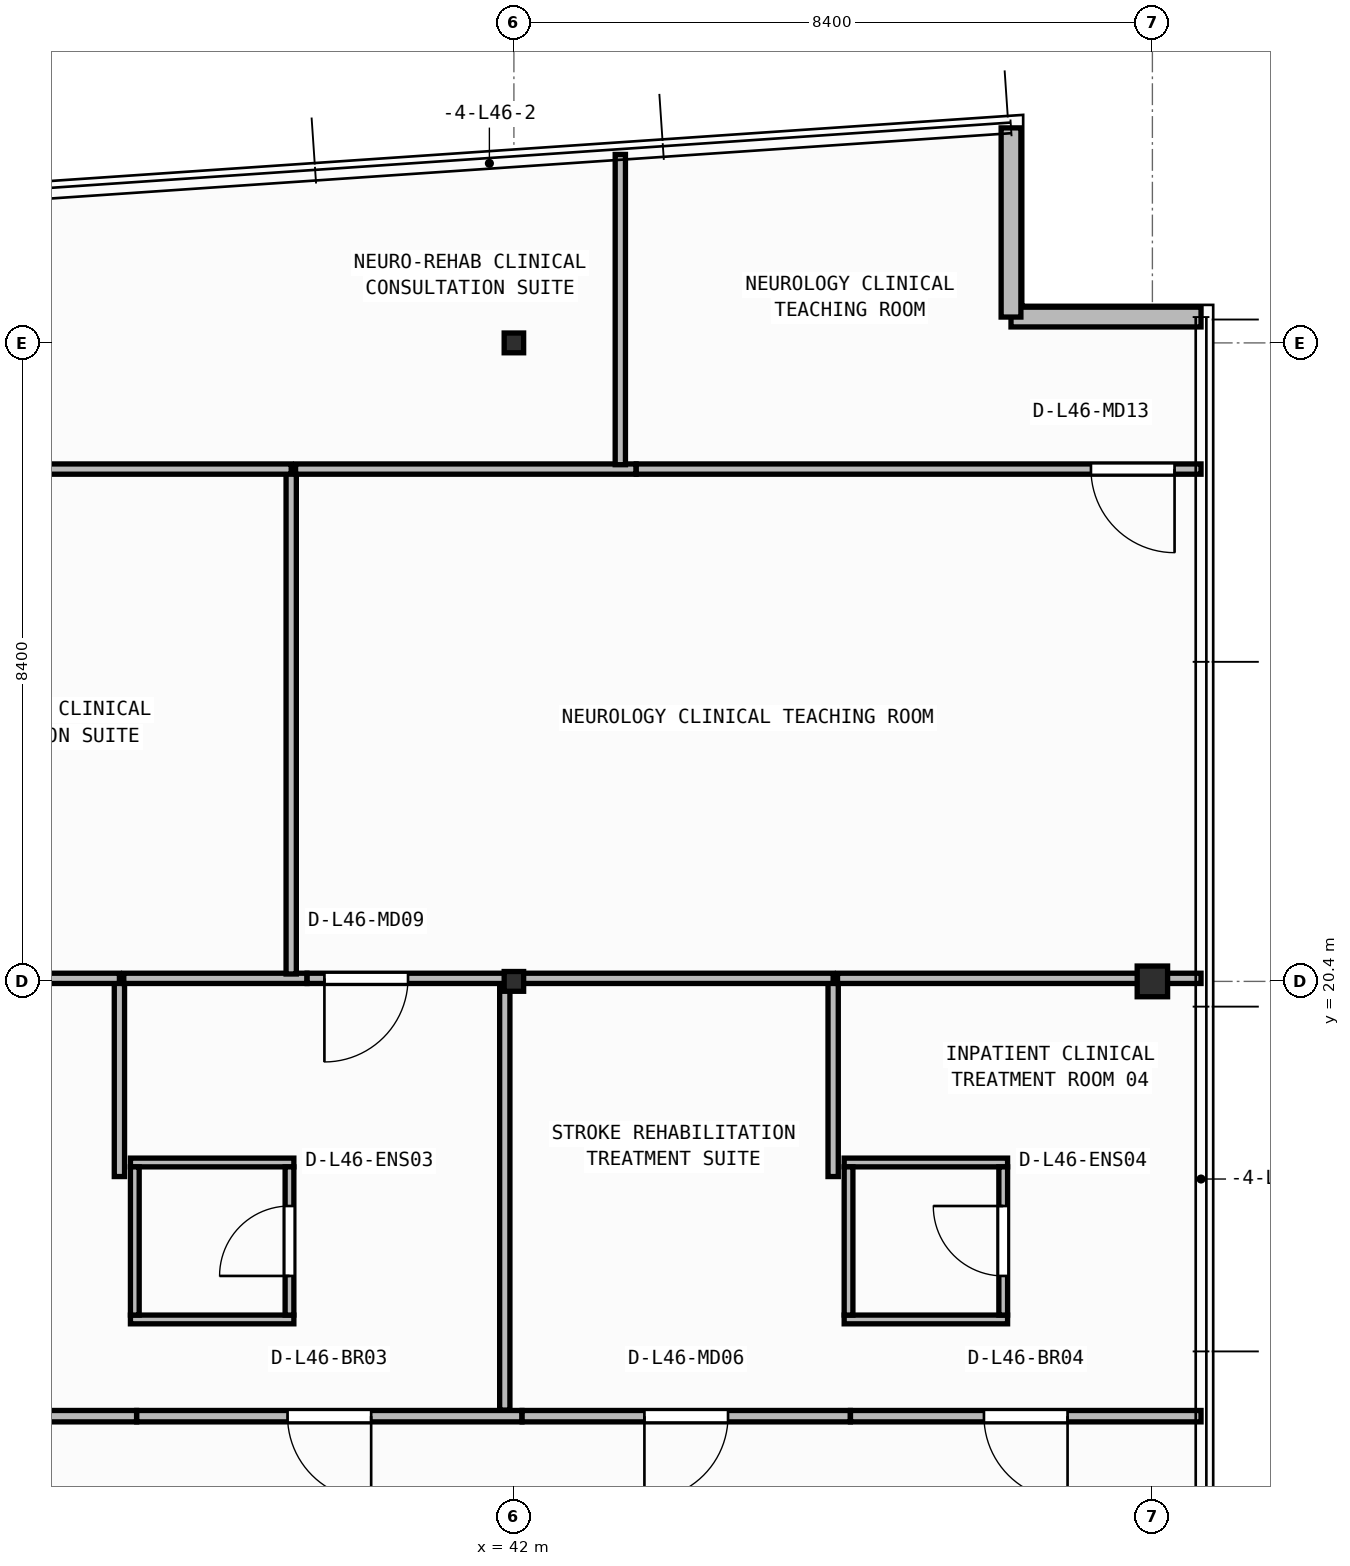
"""IFC4 building model, lengths in metres.
Left out: names, types, materials, properties, quantities, classifications, styles, units other than length and angle.
Written with IfcOpenShell. Run it as: python <this file> out.ifc"""

import sys

from ifc_helpers import new_model, si_unit, direction, frame, frame_2d, origin, origin_2d, place, context, subcontext, project, spatial, rectangle, i_section, extrude, element, fill, save


model = new_model("IFC4")
c1 = context("Model", 3, precision=1e-05, world=origin(), true_north=direction((0.0, 1.0)))
c2 = subcontext(c1, "Body", "Model", "MODEL_VIEW")
j1 = project(units=[si_unit("LENGTHUNIT", "METRE"), si_unit("PLANEANGLEUNIT", "RADIAN")], contexts=[c1])
p1 = place(None, origin())
s1 = spatial("IfcSite", under=j1, at=p1, CompositionType="ELEMENT")
p2 = place(p1, origin())
s2 = spatial("IfcBuilding", under=s1, at=p2, CompositionType="ELEMENT")
p3 = place(p2, frame((0.0, 0.0, 188.15)))
s3 = spatial("IfcBuildingStorey", under=s2, at=p3, CompositionType="ELEMENT", Elevation=188.15)
p4 = place(p3, frame((42.0, 20.4, 0.0), z_axis=(0.0, 0.0, 1.0), x_axis=(1.0, 0.0, 0.0)))
e1 = element("IfcColumn", 1, at=p4, inside=s3, PredefinedType="COLUMN", context=c2, shape_type="SweptSolid", body=[
    extrude(i_section(OverallWidth=0.256, OverallDepth=0.26, WebThickness=0.01, FlangeThickness=0.017, FilletRadius=0.013, at=origin_2d()), origin(), (0.0, 0.0, 1.0), 3.95),
])
p5 = place(p3, frame((50.4, 20.4, 0.0), z_axis=(0.0, 0.0, 1.0), x_axis=(1.0, 0.0, 0.0)))
e2 = element("IfcColumn", 2, at=p5, inside=s3, PredefinedType="COLUMN", context=c2, shape_type="SweptSolid", body=[
    extrude(i_section(OverallWidth=0.4, OverallDepth=0.404, WebThickness=0.02, FlangeThickness=0.032, at=origin_2d()), origin(), (0.0, 0.0, 1.0), 3.95),
])
p6 = place(p3, frame((42.0, 28.8, 0.0), z_axis=(0.0, 0.0, 1.0), x_axis=(1.0, 0.0, 0.0)))
e3 = element("IfcColumn", 3, at=p6, inside=s3, PredefinedType="COLUMN", context=c2, shape_type="SweptSolid", body=[
    extrude(i_section(OverallWidth=0.256, OverallDepth=0.26, WebThickness=0.01, FlangeThickness=0.017, FilletRadius=0.013, at=origin_2d()), origin(), (0.0, 0.0, 1.0), 3.95),
])
p7 = place(p3, frame((51.04, 29.14, 0.0), z_axis=(0.0, 0.0, 1.0), x_axis=(-1.0, 0.0, 0.0)))
e4 = element("IfcWall", 4, at=p7, inside=s3, PredefinedType="STANDARD", context=c2, shape_type="SweptSolid", body=[
    extrude(rectangle(XDim=2.5, YDim=0.26, at=frame_2d((1.25, 0.0))), origin(), (0.0, 0.0, 1.0), 3.71),
])
p8 = place(p3, frame((48.54, 29.14, 0.0), z_axis=(0.0, 0.0, 1.0), x_axis=(0.0, 1.0, 0.0)))
e5 = element("IfcWall", 5, at=p8, inside=s3, PredefinedType="STANDARD", context=c2, shape_type="SweptSolid", body=[
    extrude(rectangle(XDim=2.489, YDim=0.26, at=frame_2d((1.245, 0.0))), origin(), (0.0, 0.0, 1.0), 3.71),
])
p9 = place(p3, frame((36.955, 15.952, 0.0), z_axis=(0.0, 0.0, 1.0), x_axis=(1.0, 0.0, 0.0)))
e6 = element("IfcWall", 6, at=p9, inside=s3, PredefinedType="PARTITIONING", context=c2, shape_type="SweptSolid", body=[
    extrude(rectangle(XDim=2.15, YDim=0.115, at=frame_2d((1.075, 0.0))), origin(), (0.0, 0.0, 1.0), 3.378),
])
p10 = place(p3, frame((36.955, 18.018, 0.0), z_axis=(0.0, 0.0, 1.0), x_axis=(1.0, 0.0, 0.0)))
e7 = element("IfcWall", 7, at=p10, inside=s3, PredefinedType="PARTITIONING", context=c2, shape_type="SweptSolid", body=[
    extrude(rectangle(XDim=2.15, YDim=0.115, at=frame_2d((1.075, 0.0))), origin(), (0.0, 0.0, 1.0), 3.71),
])
p11 = place(p3, frame((37.012, 16.01, 0.0), z_axis=(0.0, 0.0, 1.0), x_axis=(0.0, 1.0, 0.0)))
e8 = element("IfcWall", 8, at=p11, inside=s3, PredefinedType="PARTITIONING", context=c2, shape_type="SweptSolid", body=[
    extrude(rectangle(XDim=1.95, YDim=0.115, at=frame_2d((0.975, 0.0))), origin(), (0.0, 0.0, 1.0), 3.71),
])
p12 = place(p3, frame((39.048, 16.01, 0.0), z_axis=(0.0, 0.0, 1.0), x_axis=(0.0, 1.0, 0.0)))
e9 = element("IfcWall", 9, at=p12, inside=s3, PredefinedType="PARTITIONING", context=c2, shape_type="SweptSolid", body=[
    extrude(rectangle(XDim=1.95, YDim=0.115, at=frame_2d((0.975, 0.0))), origin(), (0.0, 0.0, 1.0), 3.71),
])
p13 = place(p12, frame((0.515, 0.0, 0.0)))
e10 = element("IfcOpeningElement", 10, at=p13, cuts=e9, PredefinedType="OPENING", context=c2, shape_type="SweptSolid", body=[
    extrude(rectangle(XDim=0.92, YDim=2.1, at=frame_2d((0.46, 1.05))), frame((0.0, 0.067, 0.0), z_axis=(0.0, -1.0, 0.0), x_axis=(1.0, 0.0, 0.0)), (0.0, 0.0, 1.0), 0.135),
])
p14 = place(p3, frame((46.345, 15.952, 0.0), z_axis=(0.0, 0.0, 1.0), x_axis=(1.0, 0.0, 0.0)))
e11 = element("IfcWall", 11, at=p14, inside=s3, PredefinedType="PARTITIONING", context=c2, shape_type="SweptSolid", body=[
    extrude(rectangle(XDim=2.15, YDim=0.115, at=frame_2d((1.075, 0.0))), origin(), (0.0, 0.0, 1.0), 3.378),
])
p15 = place(p3, frame((46.345, 18.018, 0.0), z_axis=(0.0, 0.0, 1.0), x_axis=(1.0, 0.0, 0.0)))
e12 = element("IfcWall", 12, at=p15, inside=s3, PredefinedType="PARTITIONING", context=c2, shape_type="SweptSolid", body=[
    extrude(rectangle(XDim=2.15, YDim=0.115, at=frame_2d((1.075, 0.0))), origin(), (0.0, 0.0, 1.0), 3.71),
])
p16 = place(p3, frame((46.403, 16.01, 0.0), z_axis=(0.0, 0.0, 1.0), x_axis=(0.0, 1.0, 0.0)))
e13 = element("IfcWall", 13, at=p16, inside=s3, PredefinedType="PARTITIONING", context=c2, shape_type="SweptSolid", body=[
    extrude(rectangle(XDim=1.95, YDim=0.115, at=frame_2d((0.975, 0.0))), origin(), (0.0, 0.0, 1.0), 3.71),
])
p17 = place(p3, frame((48.438, 16.01, 0.0), z_axis=(0.0, 0.0, 1.0), x_axis=(0.0, 1.0, 0.0)))
e14 = element("IfcWall", 14, at=p17, inside=s3, PredefinedType="PARTITIONING", context=c2, shape_type="SweptSolid", body=[
    extrude(rectangle(XDim=1.95, YDim=0.115, at=frame_2d((0.975, 0.0))), origin(), (0.0, 0.0, 1.0), 3.71),
])
p18 = place(p17, frame((0.515, 0.0, 0.0)))
e15 = element("IfcOpeningElement", 15, at=p18, cuts=e14, PredefinedType="OPENING", context=c2, shape_type="SweptSolid", body=[
    extrude(rectangle(XDim=0.92, YDim=2.1, at=frame_2d((0.46, 1.05))), frame((0.0, 0.067, 0.0), z_axis=(0.0, -1.0, 0.0), x_axis=(1.0, 0.0, 0.0)), (0.0, 0.0, 1.0), 0.135),
])
p19 = place(p3, frame((37.036, 14.68, 0.0), z_axis=(0.0, 0.0, 1.0), x_axis=(-1.0, 0.0, 0.0)))
e16 = element("IfcWall", 16, at=p19, inside=s3, PredefinedType="PARTITIONING", context=c2, shape_type="SweptSolid", body=[
    extrude(rectangle(XDim=4.688, YDim=0.15, at=frame_2d((2.344, 0.0))), origin(), (0.0, 0.0, 1.0), 3.71),
])
p20 = place(p19, frame((1.794, 0.0, 0.0)))
e17 = element("IfcOpeningElement", 17, at=p20, cuts=e16, PredefinedType="OPENING", context=c2, shape_type="SweptSolid", body=[
    extrude(rectangle(XDim=1.1, YDim=2.1, at=frame_2d((0.55, 1.05))), frame((0.0, 0.085, 0.0), z_axis=(0.0, -1.0, 0.0), x_axis=(1.0, 0.0, 0.0)), (0.0, 0.0, 1.0), 0.17),
])
p21 = place(p3, frame((42.106, 14.68, 0.0), z_axis=(0.0, 0.0, 1.0), x_axis=(-1.0, 0.0, 0.0)))
e18 = element("IfcWall", 18, at=p21, inside=s3, PredefinedType="PARTITIONING", context=c2, shape_type="SweptSolid", body=[
    extrude(rectangle(XDim=5.068, YDim=0.15, at=frame_2d((2.534, 0.0))), origin(), (0.0, 0.0, 1.0), 3.71),
])
p22 = place(p21, frame((1.984, 0.0, 0.0)))
e19 = element("IfcOpeningElement", 19, at=p22, cuts=e18, PredefinedType="OPENING", context=c2, shape_type="SweptSolid", body=[
    extrude(rectangle(XDim=1.1, YDim=2.1, at=frame_2d((0.55, 1.05))), frame((0.0, 0.085, 0.0), z_axis=(0.0, -1.0, 0.0), x_axis=(1.0, 0.0, 0.0)), (0.0, 0.0, 1.0), 0.17),
])
p23 = place(p3, frame((46.426, 14.68, 0.0), z_axis=(0.0, 0.0, 1.0), x_axis=(-1.0, 0.0, 0.0)))
e20 = element("IfcWall", 20, at=p23, inside=s3, PredefinedType="PARTITIONING", context=c2, shape_type="SweptSolid", body=[
    extrude(rectangle(XDim=4.318, YDim=0.15, at=frame_2d((2.159, 0.0))), origin(), (0.0, 0.0, 1.0), 3.71),
])
p24 = place(p23, frame((1.609, 0.0, 0.0)))
e21 = element("IfcOpeningElement", 21, at=p24, cuts=e20, PredefinedType="OPENING", context=c2, shape_type="SweptSolid", body=[
    extrude(rectangle(XDim=1.1, YDim=2.1, at=frame_2d((0.55, 1.05))), frame((0.0, 0.085, 0.0), z_axis=(0.0, -1.0, 0.0), x_axis=(1.0, 0.0, 0.0)), (0.0, 0.0, 1.0), 0.17),
])
p25 = place(p3, frame((51.04, 14.68, 0.0), z_axis=(0.0, 0.0, 1.0), x_axis=(-1.0, 0.0, 0.0)))
e22 = element("IfcWall", 22, at=p25, inside=s3, PredefinedType="PARTITIONING", context=c2, shape_type="SweptSolid", body=[
    extrude(rectangle(XDim=4.612, YDim=0.15, at=frame_2d((2.306, 0.0))), origin(), (0.0, 0.0, 1.0), 3.71),
])
p26 = place(p25, frame((1.756, 0.0, 0.0)))
e23 = element("IfcOpeningElement", 23, at=p26, cuts=e22, PredefinedType="OPENING", context=c2, shape_type="SweptSolid", body=[
    extrude(rectangle(XDim=1.1, YDim=2.1, at=frame_2d((0.55, 1.05))), frame((0.0, 0.085, 0.0), z_axis=(0.0, -1.0, 0.0), x_axis=(1.0, 0.0, 0.0)), (0.0, 0.0, 1.0), 0.17),
])
p27 = place(p3, frame((36.81, 17.833, 0.0), z_axis=(0.0, 0.0, 1.0), x_axis=(0.0, 1.0, 0.0)))
e24 = element("IfcWall", 24, at=p27, inside=s3, PredefinedType="PARTITIONING", context=c2, shape_type="SweptSolid", body=[
    extrude(rectangle(XDim=2.607, YDim=0.135, at=frame_2d((1.304, 0.0))), origin(), (0.0, 0.0, 1.0), 3.71),
])
p28 = place(p3, frame((36.81, 20.44, 0.0), z_axis=(0.0, 0.0, 1.0), x_axis=(-1.0, 0.0, 0.0)))
e25 = element("IfcWall", 25, at=p28, inside=s3, PredefinedType="PARTITIONING", context=c2, shape_type="SweptSolid", body=[
    extrude(rectangle(XDim=4.633, YDim=0.135, at=frame_2d((2.316, 0.0))), origin(), (0.0, 0.0, 1.0), 3.152),
])
p29 = place(p3, frame((41.88, 14.76, 0.0), z_axis=(0.0, 0.0, 1.0), x_axis=(0.0, 1.0, 0.0)))
e26 = element("IfcWall", 26, at=p29, inside=s3, PredefinedType="PARTITIONING", context=c2, shape_type="SweptSolid", body=[
    extrude(rectangle(XDim=5.68, YDim=0.135, at=frame_2d((2.84, 0.0))), origin(), (0.0, 0.0, 1.0), 3.152),
])
p30 = place(p3, frame((39.278, 20.44, 0.0), z_axis=(0.0, 0.0, 1.0), x_axis=(-1.0, 0.0, 0.0)))
e27 = element("IfcWall", 27, at=p30, inside=s3, PredefinedType="PARTITIONING", context=c2, shape_type="SweptSolid", body=[
    extrude(rectangle(XDim=2.41, YDim=0.135, at=frame_2d((1.205, 0.0))), origin(), (0.0, 0.0, 1.0), 3.152),
])
p31 = place(p3, frame((41.88, 20.44, 0.0), z_axis=(0.0, 0.0, 1.0), x_axis=(-1.0, 0.0, 0.0)))
e28 = element("IfcWall", 28, at=p31, inside=s3, PredefinedType="PARTITIONING", context=c2, shape_type="SweptSolid", body=[
    extrude(rectangle(XDim=2.6, YDim=0.135, at=frame_2d((1.3, 0.0))), origin(), (0.0, 0.0, 1.0), 3.152),
])
p32 = place(p31, frame((1.273, 0.0, 0.0)))
e29 = element("IfcOpeningElement", 29, at=p32, cuts=e28, PredefinedType="OPENING", context=c2, shape_type="SweptSolid", body=[
    extrude(rectangle(XDim=1.1, YDim=2.1, at=frame_2d((0.55, 1.05))), frame((0.0, 0.077, 0.0), z_axis=(0.0, -1.0, 0.0), x_axis=(1.0, 0.0, 0.0)), (0.0, 0.0, 1.0), 0.155),
])
p33 = place(p3, frame((46.2, 17.833, 0.0), z_axis=(0.0, 0.0, 1.0), x_axis=(0.0, 1.0, 0.0)))
e30 = element("IfcWall", 30, at=p33, inside=s3, PredefinedType="PARTITIONING", context=c2, shape_type="SweptSolid", body=[
    extrude(rectangle(XDim=2.607, YDim=0.135, at=frame_2d((1.304, 0.0))), origin(), (0.0, 0.0, 1.0), 3.71),
])
p34 = place(p3, frame((46.2, 20.44, 0.0), z_axis=(0.0, 0.0, 1.0), x_axis=(-1.0, 0.0, 0.0)))
e31 = element("IfcWall", 31, at=p34, inside=s3, PredefinedType="PARTITIONING", context=c2, shape_type="SweptSolid", body=[
    extrude(rectangle(XDim=4.262, YDim=0.135, at=frame_2d((2.131, 0.0))), origin(), (0.0, 0.0, 1.0), 3.152),
])
p35 = place(p3, frame((51.04, 20.44, 0.0), z_axis=(0.0, 0.0, 1.0), x_axis=(-1.0, 0.0, 0.0)))
e32 = element("IfcWall", 32, at=p35, inside=s3, PredefinedType="PARTITIONING", context=c2, shape_type="SweptSolid", body=[
    extrude(rectangle(XDim=4.782, YDim=0.135, at=frame_2d((2.391, 0.0))), origin(), (0.0, 0.0, 1.0), 3.152),
])
p36 = place(p3, frame((39.07, 20.498, 0.0), z_axis=(0.0, 0.0, 1.0), x_axis=(0.0, 1.0, 0.0)))
e33 = element("IfcWall", 33, at=p36, inside=s3, PredefinedType="PARTITIONING", context=c2, shape_type="SweptSolid", body=[
    extrude(rectangle(XDim=6.642, YDim=0.135, at=frame_2d((3.321, 0.0))), origin(), (0.0, 0.0, 1.0), 3.71),
])
p37 = place(p3, frame((39.07, 27.14, 0.0), z_axis=(0.0, 0.0, 1.0), x_axis=(-1.0, 0.0, 0.0)))
e34 = element("IfcWall", 34, at=p37, inside=s3, PredefinedType="PARTITIONING", context=c2, shape_type="SweptSolid", body=[
    extrude(rectangle(XDim=9.083, YDim=0.135, at=frame_2d((4.541, 0.0))), origin(), (0.0, 0.0, 1.0), 3.71),
])
p38 = place(p3, frame((43.607, 27.14, 0.0), z_axis=(0.0, 0.0, 1.0), x_axis=(-1.0, 0.0, 0.0)))
e35 = element("IfcWall", 35, at=p38, inside=s3, PredefinedType="PARTITIONING", context=c2, shape_type="SweptSolid", body=[
    extrude(rectangle(XDim=4.48, YDim=0.135, at=frame_2d((2.24, 0.0))), origin(), (0.0, 0.0, 1.0), 3.71),
])
p39 = place(p3, frame((51.04, 27.14, 0.0), z_axis=(0.0, 0.0, 1.0), x_axis=(-1.0, 0.0, 0.0)))
e36 = element("IfcWall", 36, at=p39, inside=s3, PredefinedType="PARTITIONING", context=c2, shape_type="SweptSolid", body=[
    extrude(rectangle(XDim=7.43, YDim=0.135, at=frame_2d((3.715, 0.0))), origin(), (0.0, 0.0, 1.0), 3.71),
])
p40 = place(p39, frame((0.348, 0.0, 0.0)))
e37 = element("IfcOpeningElement", 37, at=p40, cuts=e36, PredefinedType="OPENING", context=c2, shape_type="SweptSolid", body=[
    extrude(rectangle(XDim=1.1, YDim=2.1, at=frame_2d((0.55, 1.05))), frame((0.0, 0.077, 0.0), z_axis=(0.0, -1.0, 0.0), x_axis=(1.0, 0.0, 0.0)), (0.0, 0.0, 1.0), 0.155),
])
p41 = place(p3, frame((43.4, 27.198, 0.0), z_axis=(0.0, 0.0, 1.0), x_axis=(0.0, 1.0, 0.0)))
e38 = element("IfcWall", 38, at=p41, inside=s3, PredefinedType="PARTITIONING", context=c2, shape_type="SweptSolid", body=[
    extrude(rectangle(XDim=4.082, YDim=0.135, at=frame_2d((2.041, 0.0))), origin(), (0.0, 0.0, 1.0), 3.71),
])
p42 = place(p13, origin())
e39 = element("IfcDoor", 39, at=p42, inside=s3, OperationType="SINGLE_SWING_LEFT", PredefinedType="DOOR", context=c2, shape_type="SweptSolid", body=[
    extrude(rectangle(XDim=0.92, YDim=2.1, at=frame_2d((0.46, 1.05))), frame((0.0, 0.025, 0.0), z_axis=(0.0, -1.0, 0.0), x_axis=(1.0, 0.0, 0.0)), (0.0, 0.0, 1.0), 0.05),
])
fill(e10, e39)
p43 = place(p18, origin())
e40 = element("IfcDoor", 40, at=p43, inside=s3, OperationType="SINGLE_SWING_RIGHT", PredefinedType="DOOR", context=c2, shape_type="SweptSolid", body=[
    extrude(rectangle(XDim=0.92, YDim=2.1, at=frame_2d((0.46, 1.05))), frame((0.0, 0.025, 0.0), z_axis=(0.0, -1.0, 0.0), x_axis=(1.0, 0.0, 0.0)), (0.0, 0.0, 1.0), 0.05),
])
fill(e15, e40)
p44 = place(p22, origin())
e41 = element("IfcDoor", 41, at=p44, inside=s3, OperationType="SINGLE_SWING_LEFT", PredefinedType="DOOR", context=c2, shape_type="SweptSolid", body=[
    extrude(rectangle(XDim=1.1, YDim=2.1, at=frame_2d((0.55, 1.05))), frame((0.0, 0.025, 0.0), z_axis=(0.0, -1.0, 0.0), x_axis=(1.0, 0.0, 0.0)), (0.0, 0.0, 1.0), 0.05),
])
fill(e19, e41)
p45 = place(p24, origin())
e42 = element("IfcDoor", 42, at=p45, inside=s3, OperationType="SINGLE_SWING_RIGHT", PredefinedType="DOOR", context=c2, shape_type="SweptSolid", body=[
    extrude(rectangle(XDim=1.1, YDim=2.1, at=frame_2d((0.55, 1.05))), frame((0.0, 0.025, 0.0), z_axis=(0.0, -1.0, 0.0), x_axis=(1.0, 0.0, 0.0)), (0.0, 0.0, 1.0), 0.05),
])
fill(e21, e42)
p46 = place(p26, origin())
e43 = element("IfcDoor", 43, at=p46, inside=s3, OperationType="SINGLE_SWING_LEFT", PredefinedType="DOOR", context=c2, shape_type="SweptSolid", body=[
    extrude(rectangle(XDim=1.1, YDim=2.1, at=frame_2d((0.55, 1.05))), frame((0.0, 0.025, 0.0), z_axis=(0.0, -1.0, 0.0), x_axis=(1.0, 0.0, 0.0)), (0.0, 0.0, 1.0), 0.05),
])
fill(e23, e43)
p47 = place(p32, origin())
e44 = element("IfcDoor", 44, at=p47, inside=s3, OperationType="SINGLE_SWING_RIGHT", PredefinedType="DOOR", context=c2, shape_type="SweptSolid", body=[
    extrude(rectangle(XDim=1.1, YDim=2.1, at=frame_2d((0.55, 1.05))), frame((0.0, 0.025, 0.0), z_axis=(0.0, -1.0, 0.0), x_axis=(1.0, 0.0, 0.0)), (0.0, 0.0, 1.0), 0.05),
])
fill(e29, e44)
p48 = place(p40, origin())
e45 = element("IfcDoor", 45, at=p48, inside=s3, OperationType="SINGLE_SWING_LEFT", PredefinedType="DOOR", context=c2, shape_type="SweptSolid", body=[
    extrude(rectangle(XDim=1.1, YDim=2.1, at=frame_2d((0.55, 1.05))), frame((0.0, 0.025, 0.0), z_axis=(0.0, -1.0, 0.0), x_axis=(1.0, 0.0, 0.0)), (0.0, 0.0, 1.0), 0.05),
])
fill(e37, e45)
save(model, sys.argv[1])
